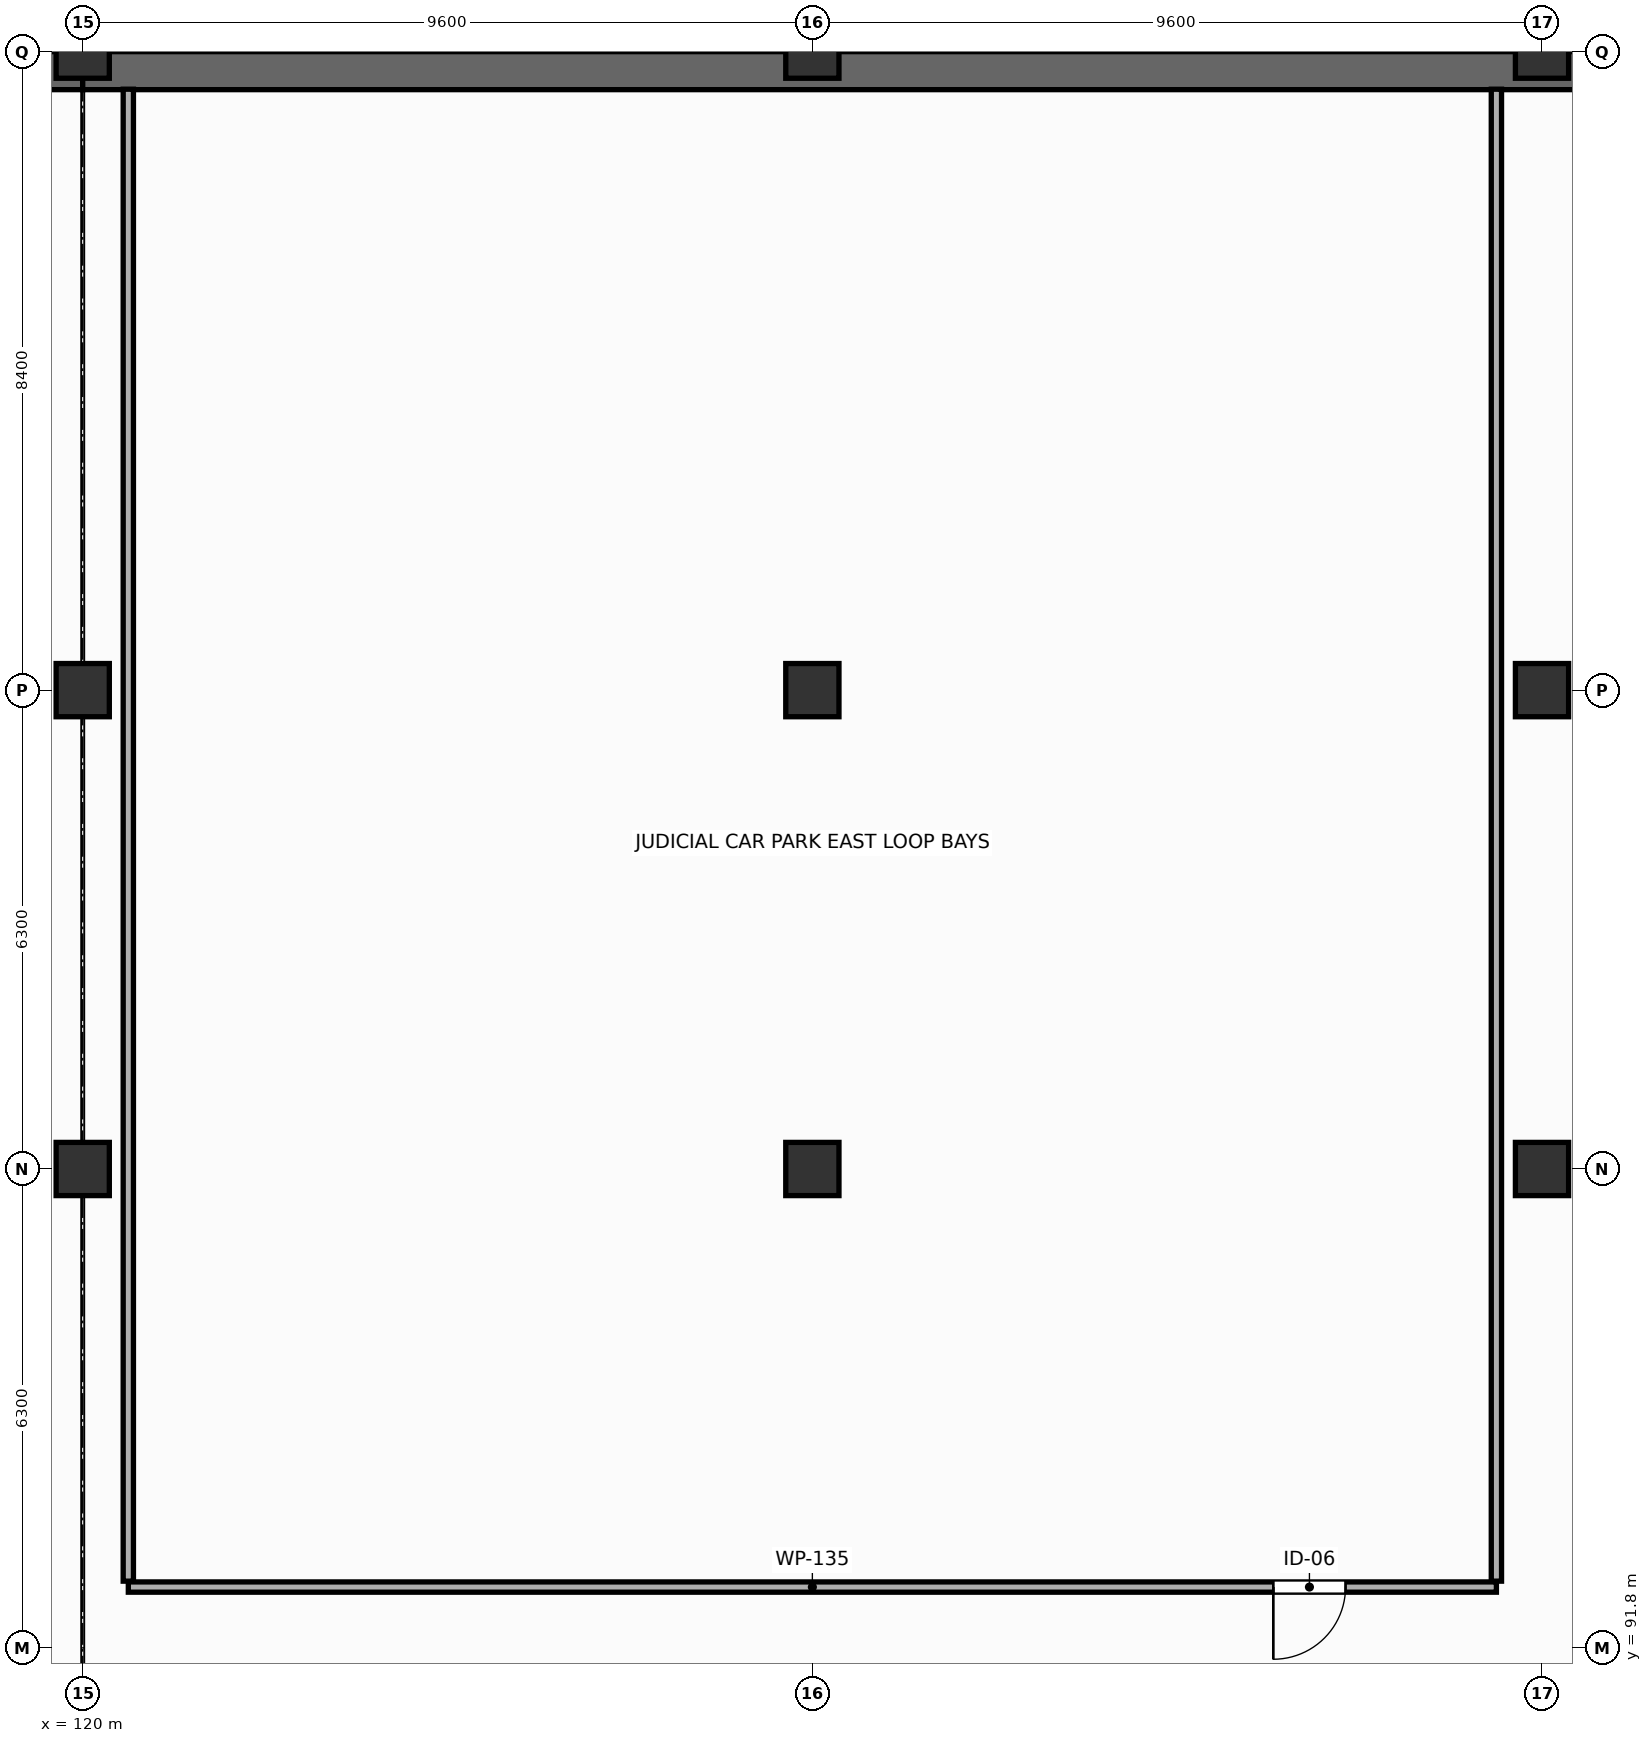
"""IFC4 building model, lengths in metres.
Left out: names, types, materials, properties, quantities, classifications, styles, units other than length and angle.
Written with IfcOpenShell. Run it as: python <this file> out.ifc"""

import sys

from ifc_helpers import new_model, si_unit, direction, frame, frame_2d, origin, origin_2d, place, context, subcontext, project, spatial, rectangle, extrude, element, fill, save


model = new_model("IFC4")
c1 = context("Model", 3, precision=1e-05, world=origin(), true_north=direction((0.0, 1.0)))
c2 = subcontext(c1, "Body", "Model", "MODEL_VIEW")
j1 = project(units=[si_unit("LENGTHUNIT", "METRE"), si_unit("PLANEANGLEUNIT", "RADIAN")], contexts=[c1])
p1 = place(None, origin())
s1 = spatial("IfcSite", under=j1, at=p1, CompositionType="ELEMENT")
p2 = place(p1, origin())
s2 = spatial("IfcBuilding", under=s1, at=p2, CompositionType="ELEMENT")
p3 = place(p2, frame((0.0, 0.0, -4.8)))
s3 = spatial("IfcBuildingStorey", under=s2, at=p3, CompositionType="ELEMENT", Elevation=-4.8)
for number, where, z_axis, x_axis in (
    (1, (120.0, 98.1, -0.42), (0.0, 0.0, 1.0), (1.0, 0.0, 0.0)),
    (2, (120.0, 104.4, -0.42), (0.0, 0.0, 1.0), (1.0, 0.0, 0.0)),
    (3, (120.0, 112.8, -0.42), (0.0, 0.0, 1.0), (1.0, 0.0, 0.0)),
    (4, (129.6, 98.1, -0.42), (0.0, 0.0, 1.0), (1.0, 0.0, 0.0)),
    (5, (129.6, 104.4, -0.42), (0.0, 0.0, 1.0), (1.0, 0.0, 0.0)),
    (6, (129.6, 112.8, -0.42), (0.0, 0.0, 1.0), (1.0, 0.0, 0.0)),
    (7, (139.2, 98.1, -0.42), (0.0, 0.0, 1.0), (1.0, 0.0, 0.0)),
    (8, (139.2, 104.4, -0.42), (0.0, 0.0, 1.0), (1.0, 0.0, 0.0)),
    (9, (139.2, 112.8, -0.42), (0.0, 0.0, 1.0), (1.0, 0.0, 0.0)),
):
    element("IfcColumn", number, at=place(p3, frame(where, z_axis=z_axis, x_axis=x_axis)), inside=s3, PredefinedType="COLUMN", context=c2, shape_type="SweptSolid", body=[
        extrude(rectangle(XDim=0.7, YDim=0.7, at=origin_2d()), origin(), (0.0, 0.0, 1.0), 5.22),
    ])
p4 = place(p3, frame((58.8, 112.55, -0.42), z_axis=(0.0, 0.0, 1.0), x_axis=(1.0, 0.0, 0.0)))
e10 = element("IfcWall", 10, at=p4, inside=s3, PredefinedType="SOLIDWALL", context=c2, shape_type="SweptSolid", body=[
    extrude(rectangle(XDim=61.2, YDim=0.5, at=frame_2d((30.6, 0.0))), origin(), (0.0, 0.0, 1.0), 4.87),
])
p5 = place(p3, frame((120.0, 112.55, -0.42), z_axis=(0.0, 0.0, 1.0), x_axis=(1.0, 0.0, 0.0)))
e11 = element("IfcWall", 11, at=p5, inside=s3, PredefinedType="SOLIDWALL", context=c2, shape_type="SweptSolid", body=[
    extrude(rectangle(XDim=42.0, YDim=0.5, at=frame_2d((21.0, 0.0))), origin(), (0.0, 0.0, 1.0), 4.87),
])
p6 = place(p3, frame((138.6, 92.6, 0.0), z_axis=(0.0, 0.0, 1.0), x_axis=(-1.0, 0.0, 0.0)))
e12 = element("IfcWall", 12, at=p6, inside=s3, PredefinedType="PARTITIONING", context=c2, shape_type="SweptSolid", body=[
    extrude(rectangle(XDim=18.0, YDim=0.135, at=frame_2d((9.0, 0.0))), origin(), (0.0, 0.0, 1.0), 3.59),
])
p7 = place(p6, frame((1.985, 0.0, 0.0)))
e13 = element("IfcOpeningElement", 13, at=p7, cuts=e12, PredefinedType="OPENING", context=c2, shape_type="SweptSolid", body=[
    extrude(rectangle(XDim=0.95, YDim=2.15, at=frame_2d((0.475, 1.075))), frame((0.0, 0.077, 0.0), z_axis=(0.0, -1.0, 0.0), x_axis=(1.0, 0.0, 0.0)), (0.0, 0.0, 1.0), 0.155),
])
for number, where, z_axis, x_axis in (
    (14, (120.6, 92.677, 0.0), (0.0, 0.0, 1.0), (0.0, 1.0, 0.0)),
    (15, (138.6, 112.306, 0.0), (0.0, 0.0, 1.0), (0.0, -1.0, 0.0)),
):
    element("IfcWall", number, at=place(p3, frame(where, z_axis=z_axis, x_axis=x_axis)), inside=s3, PredefinedType="PARTITIONING", context=c2, shape_type="SweptSolid", body=[
        extrude(rectangle(XDim=19.628, YDim=0.135, at=frame_2d((9.814, 0.0))), origin(), (0.0, 0.0, 1.0), 3.69),
    ])
p8 = place(p7, origin())
e16 = element("IfcDoor", 16, at=p8, inside=s3, OperationType="SINGLE_SWING_RIGHT", PredefinedType="DOOR", context=c2, shape_type="SweptSolid", body=[
    extrude(rectangle(XDim=0.95, YDim=2.15, at=frame_2d((0.475, 1.075))), frame((0.0, 0.025, 0.0), z_axis=(0.0, -1.0, 0.0), x_axis=(1.0, 0.0, 0.0)), (0.0, 0.0, 1.0), 0.05),
])
fill(e13, e16)
save(model, sys.argv[1])
